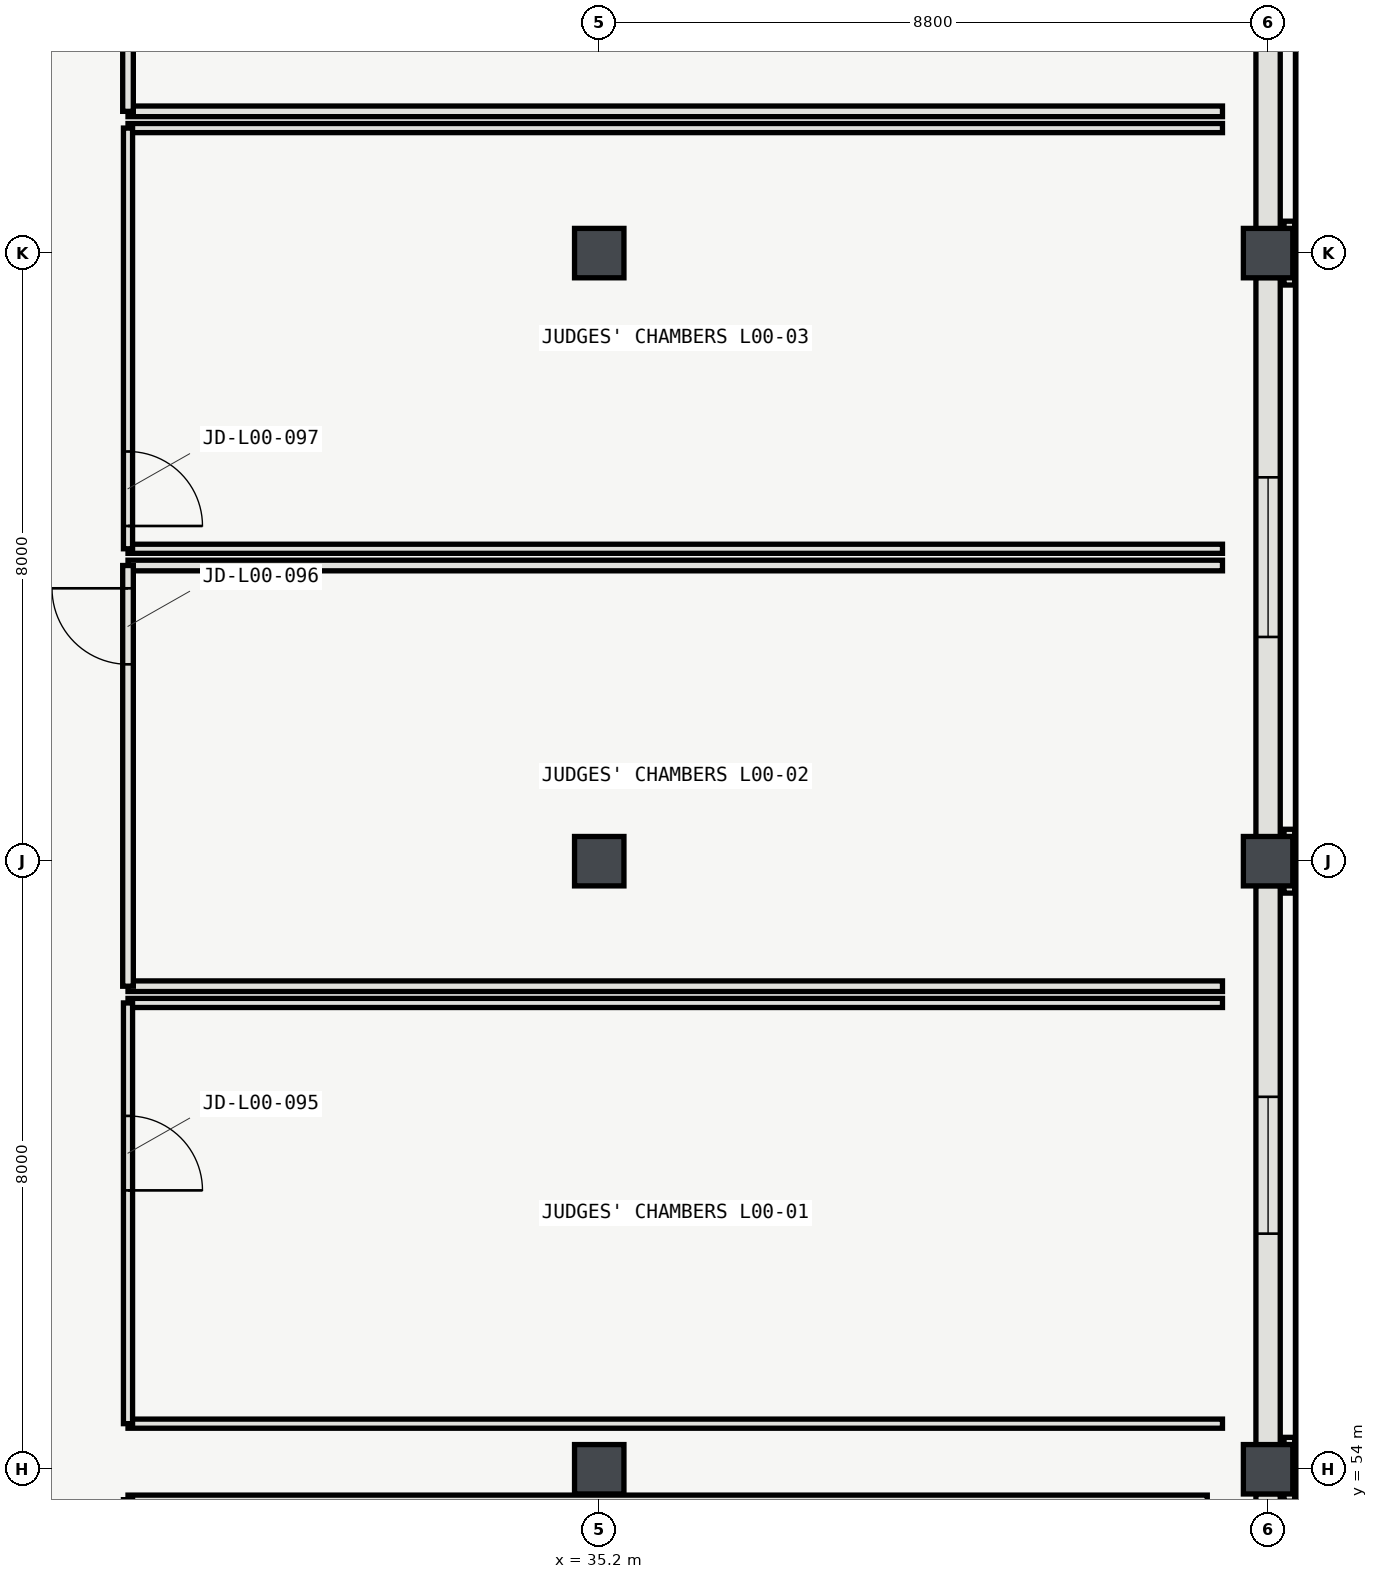
"""IFC4 building model, lengths in metres.
Left out: names, types, materials, properties, quantities, classifications, styles, units other than length and angle.
Written with IfcOpenShell. Run it as: python <this file> out.ifc"""

import sys

from ifc_helpers import new_model, si_unit, direction, frame, frame_2d, origin, origin_2d, place, context, subcontext, project, spatial, rectangle, hollow_rectangle, extrude, element, fill, save


model = new_model("IFC4")
c1 = context("Model", 3, precision=1e-05, world=origin(), true_north=direction((0.0, 1.0)))
c2 = subcontext(c1, "Body", "Model", "MODEL_VIEW")
j1 = project(units=[si_unit("LENGTHUNIT", "METRE"), si_unit("PLANEANGLEUNIT", "RADIAN")], contexts=[c1])
p1 = place(None, origin())
s1 = spatial("IfcSite", under=j1, at=p1, CompositionType="ELEMENT")
p2 = place(p1, origin())
s2 = spatial("IfcBuilding", under=s1, at=p2, CompositionType="ELEMENT")
p3 = place(p2, origin())
s3 = spatial("IfcBuildingStorey", under=s2, at=p3, CompositionType="ELEMENT", Elevation=0.0)
for number, where, z_axis, x_axis in (
    (1, (35.2, 54.0, 0.0), (0.0, 0.0, 1.0), (1.0, 0.0, 0.0)),
    (2, (35.2, 62.0, 0.0), (0.0, 0.0, 1.0), (1.0, 0.0, 0.0)),
    (3, (35.2, 70.0, 0.0), (0.0, 0.0, 1.0), (1.0, 0.0, 0.0)),
    (4, (44.0, 54.0, 0.0), (0.0, 0.0, 1.0), (1.0, 0.0, 0.0)),
    (5, (44.0, 62.0, 0.0), (0.0, 0.0, 1.0), (1.0, 0.0, 0.0)),
    (6, (44.0, 70.0, 0.0), (0.0, 0.0, 1.0), (1.0, 0.0, 0.0)),
):
    element("IfcColumn", number, at=place(p3, frame(where, z_axis=z_axis, x_axis=x_axis)), inside=s3, PredefinedType="COLUMN", context=c2, shape_type="SweptSolid", body=[
        extrude(hollow_rectangle(XDim=0.65, YDim=0.65, WallThickness=0.026, InnerFilletRadius=0.026, OuterFilletRadius=0.052, at=origin_2d()), origin(), (0.0, 0.0, 1.0), 5.4),
    ])
p4 = place(p3, frame((44.0, 46.321, 0.0), z_axis=(0.0, 0.0, 1.0), x_axis=(0.0, 1.0, 0.0)))
e7 = element("IfcWall", 7, at=p4, inside=s3, PredefinedType="SOLIDWALL", context=c2, shape_type="SweptSolid", body=[
    extrude(rectangle(XDim=7.358, YDim=0.32, at=frame_2d((3.679, 0.0))), origin(), (0.0, 0.0, 1.0), 4.523),
])
p5 = place(p4, frame((2.929, 0.0, 0.95)))
e8 = element("IfcOpeningElement", 8, at=p5, cuts=e7, PredefinedType="OPENING", context=c2, shape_type="SweptSolid", body=[
    extrude(rectangle(XDim=1.5, YDim=1.2, at=frame_2d((0.75, 0.6))), frame((0.0, 0.17, 0.0), z_axis=(0.0, -1.0, 0.0), x_axis=(1.0, 0.0, 0.0)), (0.0, 0.0, 1.0), 0.34),
])
p6 = place(p3, frame((44.0, 54.321, 0.0), z_axis=(0.0, 0.0, 1.0), x_axis=(0.0, 1.0, 0.0)))
e9 = element("IfcWall", 9, at=p6, inside=s3, PredefinedType="SOLIDWALL", context=c2, shape_type="SweptSolid", body=[
    extrude(rectangle(XDim=7.358, YDim=0.32, at=frame_2d((3.679, 0.0))), origin(), (0.0, 0.0, 1.0), 4.523),
])
p7 = place(p6, frame((2.779, 0.0, 0.95)))
e10 = element("IfcOpeningElement", 10, at=p7, cuts=e9, PredefinedType="OPENING", context=c2, shape_type="SweptSolid", body=[
    extrude(rectangle(XDim=1.8, YDim=1.2, at=frame_2d((0.9, 0.6))), frame((0.0, 0.17, 0.0), z_axis=(0.0, -1.0, 0.0), x_axis=(1.0, 0.0, 0.0)), (0.0, 0.0, 1.0), 0.34),
])
p8 = place(p3, frame((44.0, 62.321, 0.0), z_axis=(0.0, 0.0, 1.0), x_axis=(0.0, 1.0, 0.0)))
e11 = element("IfcWall", 11, at=p8, inside=s3, PredefinedType="SOLIDWALL", context=c2, shape_type="SweptSolid", body=[
    extrude(rectangle(XDim=7.358, YDim=0.32, at=frame_2d((3.679, 0.0))), origin(), (0.0, 0.0, 1.0), 4.523),
])
p9 = place(p8, frame((2.629, 0.0, 0.95)))
e12 = element("IfcOpeningElement", 12, at=p9, cuts=e11, PredefinedType="OPENING", context=c2, shape_type="SweptSolid", body=[
    extrude(rectangle(XDim=2.1, YDim=1.2, at=frame_2d((1.05, 0.6))), frame((0.0, 0.17, 0.0), z_axis=(0.0, -1.0, 0.0), x_axis=(1.0, 0.0, 0.0)), (0.0, 0.0, 1.0), 0.34),
])
p10 = place(p3, frame((44.0, 70.321, 0.0), z_axis=(0.0, 0.0, 1.0), x_axis=(0.0, 1.0, 0.0)))
e13 = element("IfcWall", 13, at=p10, inside=s3, PredefinedType="SOLIDWALL", context=c2, shape_type="SweptSolid", body=[
    extrude(rectangle(XDim=7.483, YDim=0.32, at=frame_2d((3.741, 0.0))), origin(), (0.0, 0.0, 1.0), 4.523),
])
p11 = place(p10, frame((2.479, 0.0, 0.95)))
e14 = element("IfcOpeningElement", 14, at=p11, cuts=e13, PredefinedType="OPENING", context=c2, shape_type="SweptSolid", body=[
    extrude(rectangle(XDim=2.4, YDim=1.5, at=frame_2d((1.2, 0.75))), frame((0.0, 0.17, 0.0), z_axis=(0.0, -1.0, 0.0), x_axis=(1.0, 0.0, 0.0)), (0.0, 0.0, 1.0), 0.34),
])
p12 = place(p3, frame((44.44, 30.0, 0.0), z_axis=(0.0, 0.0, 1.0), x_axis=(0.0, 1.0, 0.0)))
e15 = element("IfcWall", 15, at=p12, inside=s3, PredefinedType="SOLIDWALL", context=c2, shape_type="SweptSolid", body=[
    extrude(rectangle(XDim=48.0, YDim=0.16, at=frame_2d((24.0, 0.0))), origin(), (0.0, 0.0, 1.0), 0.58),
])
for number, where, z_axis, x_axis in (
    (16, (44.28, 53.58, 0.0), (0.0, 0.0, 1.0), (0.0, 1.0, 0.0)),
    (17, (44.28, 61.58, 0.0), (0.0, 0.0, 1.0), (0.0, 1.0, 0.0)),
    (18, (44.28, 69.58, 0.0), (0.0, 0.0, 1.0), (0.0, 1.0, 0.0)),
):
    element("IfcWall", number, at=place(p3, frame(where, z_axis=z_axis, x_axis=x_axis)), inside=s3, PredefinedType="SOLIDWALL", context=c2, shape_type="SweptSolid", body=[
        extrude(rectangle(XDim=0.84, YDim=0.14, at=frame_2d((0.42, 0.0))), origin(), (0.0, 0.0, 1.0), 5.14),
    ])
for number, where, z_axis, x_axis in (
    (19, (29.0, 54.6, 0.0), (0.0, 0.0, 1.0), (1.0, 0.0, 0.0)),
    (20, (43.4, 60.135, 0.0), (0.0, 0.0, 1.0), (-1.0, 0.0, 0.0)),
):
    element("IfcWall", number, at=place(p3, frame(where, z_axis=z_axis, x_axis=x_axis)), inside=s3, PredefinedType="PARTITIONING", context=c2, shape_type="SweptSolid", body=[
        extrude(rectangle(XDim=14.4, YDim=0.12, at=frame_2d((7.2, 0.0))), origin(), (0.0, 0.0, 1.0), 5.12),
    ])
p13 = place(p3, frame((29.0, 60.135, 0.0), z_axis=(0.0, 0.0, 1.0), x_axis=(0.0, -1.0, 0.0)))
e21 = element("IfcWall", 21, at=p13, inside=s3, PredefinedType="PARTITIONING", context=c2, shape_type="SweptSolid", body=[
    extrude(rectangle(XDim=5.535, YDim=0.12, at=frame_2d((2.768, 0.0))), origin(), (0.0, 0.0, 1.0), 5.12),
])
p14 = place(p13, frame((1.486, 0.0, 0.0)))
e22 = element("IfcOpeningElement", 22, at=p14, cuts=e21, PredefinedType="OPENING", context=c2, shape_type="SweptSolid", body=[
    extrude(rectangle(XDim=0.98, YDim=2.15, at=frame_2d((0.49, 1.075))), frame((0.0, 0.07, 0.0), z_axis=(0.0, -1.0, 0.0), x_axis=(1.0, 0.0, 0.0)), (0.0, 0.0, 1.0), 0.14),
])
for number, where, z_axis, x_axis in (
    (23, (29.0, 60.355, 0.0), (0.0, 0.0, 1.0), (1.0, 0.0, 0.0)),
    (24, (43.4, 65.89, 0.0), (0.0, 0.0, 1.0), (-1.0, 0.0, 0.0)),
):
    element("IfcWall", number, at=place(p3, frame(where, z_axis=z_axis, x_axis=x_axis)), inside=s3, PredefinedType="PARTITIONING", context=c2, shape_type="SweptSolid", body=[
        extrude(rectangle(XDim=14.4, YDim=0.14, at=frame_2d((7.2, 0.0))), origin(), (0.0, 0.0, 1.0), 5.12),
    ])
p15 = place(p3, frame((29.0, 65.89, 0.0), z_axis=(0.0, 0.0, 1.0), x_axis=(0.0, -1.0, 0.0)))
e25 = element("IfcWall", 25, at=p15, inside=s3, PredefinedType="PARTITIONING", context=c2, shape_type="SweptSolid", body=[
    extrude(rectangle(XDim=5.535, YDim=0.14, at=frame_2d((2.768, 0.0))), origin(), (0.0, 0.0, 1.0), 5.12),
])
p16 = place(p15, frame((0.3, 0.0, 0.0)))
e26 = element("IfcOpeningElement", 26, at=p16, cuts=e25, PredefinedType="OPENING", context=c2, shape_type="SweptSolid", body=[
    extrude(rectangle(XDim=1.0, YDim=2.2, at=frame_2d((0.5, 1.1))), frame((0.0, 0.08, 0.0), z_axis=(0.0, -1.0, 0.0), x_axis=(1.0, 0.0, 0.0)), (0.0, 0.0, 1.0), 0.16),
])
for number, where, z_axis, x_axis in (
    (27, (29.0, 66.11, 0.0), (0.0, 0.0, 1.0), (1.0, 0.0, 0.0)),
    (28, (43.4, 71.645, 0.0), (0.0, 0.0, 1.0), (-1.0, 0.0, 0.0)),
):
    element("IfcWall", number, at=place(p3, frame(where, z_axis=z_axis, x_axis=x_axis)), inside=s3, PredefinedType="PARTITIONING", context=c2, shape_type="SweptSolid", body=[
        extrude(rectangle(XDim=14.4, YDim=0.12, at=frame_2d((7.2, 0.0))), origin(), (0.0, 0.0, 1.0), 5.12),
    ])
p17 = place(p3, frame((29.0, 71.645, 0.0), z_axis=(0.0, 0.0, 1.0), x_axis=(0.0, -1.0, 0.0)))
e29 = element("IfcWall", 29, at=p17, inside=s3, PredefinedType="PARTITIONING", context=c2, shape_type="SweptSolid", body=[
    extrude(rectangle(XDim=5.535, YDim=0.12, at=frame_2d((2.768, 0.0))), origin(), (0.0, 0.0, 1.0), 5.12),
])
p18 = place(p17, frame((4.255, 0.0, 0.0)))
e30 = element("IfcOpeningElement", 30, at=p18, cuts=e29, PredefinedType="OPENING", context=c2, shape_type="SweptSolid", body=[
    extrude(rectangle(XDim=0.98, YDim=2.2, at=frame_2d((0.49, 1.1))), frame((0.0, 0.07, 0.0), z_axis=(0.0, -1.0, 0.0), x_axis=(1.0, 0.0, 0.0)), (0.0, 0.0, 1.0), 0.14),
])
p19 = place(p3, frame((29.0, 71.865, 0.0), z_axis=(0.0, 0.0, 1.0), x_axis=(1.0, 0.0, 0.0)))
e31 = element("IfcWall", 31, at=p19, inside=s3, PredefinedType="PARTITIONING", context=c2, shape_type="SweptSolid", body=[
    extrude(rectangle(XDim=14.4, YDim=0.14, at=frame_2d((7.2, 0.0))), origin(), (0.0, 0.0, 1.0), 5.12),
])
p20 = place(p3, frame((29.0, 77.4, 0.0), z_axis=(0.0, 0.0, 1.0), x_axis=(0.0, -1.0, 0.0)))
e32 = element("IfcWall", 32, at=p20, inside=s3, PredefinedType="PARTITIONING", context=c2, shape_type="SweptSolid", body=[
    extrude(rectangle(XDim=5.535, YDim=0.14, at=frame_2d((2.768, 0.0))), origin(), (0.0, 0.0, 1.0), 5.12),
])
p21 = place(p20, frame((3.055, 0.0, 0.0)))
e33 = element("IfcOpeningElement", 33, at=p21, cuts=e32, PredefinedType="OPENING", context=c2, shape_type="SweptSolid", body=[
    extrude(rectangle(XDim=1.0, YDim=2.15, at=frame_2d((0.5, 1.075))), frame((0.0, 0.08, 0.0), z_axis=(0.0, -1.0, 0.0), x_axis=(1.0, 0.0, 0.0)), (0.0, 0.0, 1.0), 0.16),
])
p22 = place(p3, frame((43.2, 53.6, 0.0), z_axis=(0.0, 0.0, 1.0), x_axis=(-1.0, 0.0, 0.0)))
e34 = element("IfcWall", 34, at=p22, inside=s3, PredefinedType="PARTITIONING", context=c2, shape_type="SweptSolid", body=[
    extrude(rectangle(XDim=14.2, YDim=0.12, at=frame_2d((7.1, 0.0))), origin(), (0.0, 0.0, 1.0), 5.12),
])
p23 = place(p3, frame((29.0, 53.6, 0.0), z_axis=(0.0, 0.0, 1.0), x_axis=(0.0, -1.0, 0.0)))
e35 = element("IfcWall", 35, at=p23, inside=s3, PredefinedType="PARTITIONING", context=c2, shape_type="SweptSolid", body=[
    extrude(rectangle(XDim=22.8, YDim=0.12, at=frame_2d((11.4, 0.0))), origin(), (0.0, 0.0, 1.0), 5.12),
])
p24 = place(p23, frame((10.9, 0.0, 0.0)))
e36 = element("IfcOpeningElement", 36, at=p24, cuts=e35, PredefinedType="OPENING", context=c2, shape_type="SweptSolid", body=[
    extrude(rectangle(XDim=1.0, YDim=2.15, at=frame_2d((0.5, 1.075))), frame((0.0, 0.07, 0.0), z_axis=(0.0, -1.0, 0.0), x_axis=(1.0, 0.0, 0.0)), (0.0, 0.0, 1.0), 0.14),
])
p25 = place(p7, origin())
e37 = element("IfcWindow", 37, at=p25, inside=s3, PartitioningType="SINGLE_PANEL", PredefinedType="WINDOW", context=c2, shape_type="SweptSolid", body=[
    extrude(rectangle(XDim=1.8, YDim=1.2, at=frame_2d((0.9, 0.6))), frame((0.0, 0.03, 0.0), z_axis=(0.0, -1.0, 0.0), x_axis=(1.0, 0.0, 0.0)), (0.0, 0.0, 1.0), 0.06),
])
fill(e10, e37)
p26 = place(p9, origin())
e38 = element("IfcWindow", 38, at=p26, inside=s3, PartitioningType="SINGLE_PANEL", PredefinedType="WINDOW", context=c2, shape_type="SweptSolid", body=[
    extrude(rectangle(XDim=2.1, YDim=1.2, at=frame_2d((1.05, 0.6))), frame((0.0, 0.03, 0.0), z_axis=(0.0, -1.0, 0.0), x_axis=(1.0, 0.0, 0.0)), (0.0, 0.0, 1.0), 0.06),
])
fill(e12, e38)
p27 = place(p14, origin())
e39 = element("IfcDoor", 39, at=p27, inside=s3, OperationType="SINGLE_SWING_RIGHT", PredefinedType="DOOR", context=c2, shape_type="SweptSolid", body=[
    extrude(rectangle(XDim=0.98, YDim=2.15, at=frame_2d((0.49, 1.075))), frame((0.0, 0.025, 0.0), z_axis=(0.0, -1.0, 0.0), x_axis=(1.0, 0.0, 0.0)), (0.0, 0.0, 1.0), 0.05),
])
fill(e22, e39)
p28 = place(p16, origin())
e40 = element("IfcDoor", 40, at=p28, inside=s3, OperationType="SINGLE_SWING_LEFT", PredefinedType="DOOR", context=c2, shape_type="SweptSolid", body=[
    extrude(rectangle(XDim=1.0, YDim=2.2, at=frame_2d((0.5, 1.1))), frame((0.0, 0.025, 0.0), z_axis=(0.0, -1.0, 0.0), x_axis=(1.0, 0.0, 0.0)), (0.0, 0.0, 1.0), 0.05),
])
fill(e26, e40)
p29 = place(p18, origin())
e41 = element("IfcDoor", 41, at=p29, inside=s3, OperationType="SINGLE_SWING_RIGHT", PredefinedType="DOOR", context=c2, shape_type="SweptSolid", body=[
    extrude(rectangle(XDim=0.98, YDim=2.2, at=frame_2d((0.49, 1.1))), frame((0.0, 0.025, 0.0), z_axis=(0.0, -1.0, 0.0), x_axis=(1.0, 0.0, 0.0)), (0.0, 0.0, 1.0), 0.05),
])
fill(e30, e41)
save(model, sys.argv[1])
